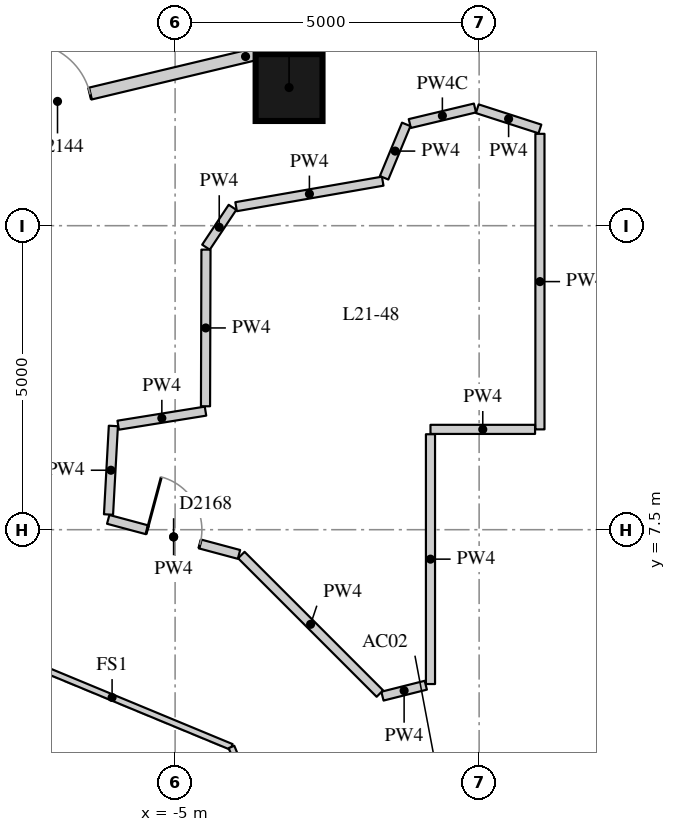
"""IFC4 building model, lengths in metres.
Left out: names, types, materials, properties, quantities, classifications, styles, units other than length and angle.
Written with IfcOpenShell. Run it as: python <this file> out.ifc"""

import sys

from ifc_helpers import new_model, si_unit, direction, frame, frame_2d, origin, origin_2d, place, context, subcontext, project, spatial, rectangle, extrude, element, fill, save


model = new_model("IFC4")
c1 = context("Model", 3, precision=1e-05, world=origin(), true_north=direction((0.0, 1.0)))
c2 = subcontext(c1, "Body", "Model", "MODEL_VIEW")
j1 = project(units=[si_unit("LENGTHUNIT", "METRE"), si_unit("PLANEANGLEUNIT", "RADIAN")], contexts=[c1])
p1 = place(None, origin())
s1 = spatial("IfcSite", under=j1, at=p1, CompositionType="ELEMENT")
p2 = place(p1, origin())
s2 = spatial("IfcBuilding", under=s1, at=p2, CompositionType="ELEMENT")
p3 = place(p2, frame((0.0, 0.0, 77.8)))
s3 = spatial("IfcBuildingStorey", under=s2, at=p3, CompositionType="ELEMENT", Elevation=77.8)
p4 = place(p3, frame((-3.126, 14.772, 0.0), z_axis=(0.0, 0.0, 1.0), x_axis=(1.0, 0.0, 0.0)))
e1 = element("IfcColumn", 1, at=p4, inside=s3, PredefinedType="COLUMN", context=c2, shape_type="SweptSolid", body=[
    extrude(rectangle(XDim=1.1, YDim=1.1, at=origin_2d()), origin(), (0.0, 0.0, 1.0), 3.3),
])
p5 = place(p3, frame((-7.683, 14.365, 0.0), z_axis=(0.0, 0.0, 1.0), x_axis=(0.972657109353, 0.23224587752, 0.0)))
e2 = element("IfcWall", 2, at=p5, inside=s3, PredefinedType="PARTITIONING", context=c2, shape_type="SweptSolid", body=[
    extrude(rectangle(XDim=7.899, YDim=0.2, at=frame_2d((3.949, 0.0))), origin(), (0.0, 0.0, 1.0), 2.57),
])
p6 = place(p5, frame((0.22, 0.0, 0.0)))
e3 = element("IfcOpeningElement", 3, at=p6, cuts=e2, PredefinedType="OPENING", context=c2, shape_type="SweptSolid", body=[
    extrude(rectangle(XDim=1.1, YDim=2.1, at=frame_2d((0.55, 1.05))), frame((0.0, 0.11, 0.0), z_axis=(0.0, -1.0, 0.0), x_axis=(1.0, 0.0, 0.0)), (0.0, 0.0, 1.0), 0.22),
])
p7 = place(p3, frame((0.095, 16.169, 0.0), z_axis=(0.0, 0.0, 1.0), x_axis=(0.951667112614, -0.307131416122, 0.0)))
e4 = element("IfcWall", 4, at=p7, inside=s3, PredefinedType="PARTITIONING", context=c2, shape_type="SweptSolid", body=[
    extrude(rectangle(XDim=8.041, YDim=0.2, at=frame_2d((4.02, 0.0))), origin(), (0.0, 0.0, 1.0), 3.02),
])
p8 = place(p7, frame((4.309, 0.0, 0.0)))
e5 = element("IfcOpeningElement", 5, at=p8, cuts=e4, PredefinedType="OPENING", context=c2, shape_type="SweptSolid", body=[
    extrude(rectangle(XDim=1.1, YDim=2.1, at=frame_2d((0.55, 1.05))), frame((0.0, 0.11, 0.0), z_axis=(0.0, -1.0, 0.0), x_axis=(1.0, 0.0, 0.0)), (0.0, 0.0, 1.0), 0.22),
])
p9 = place(p3, frame((-4.492, 12.146, 0.0), z_axis=(0.0, 0.0, 1.0), x_axis=(0.553770185429, 0.832669551341, 0.0)))
e6 = element("IfcWall", 6, at=p9, inside=s3, PredefinedType="PARTITIONING", context=c2, shape_type="SweptSolid", body=[
    extrude(rectangle(XDim=0.788, YDim=0.15, at=frame_2d((0.394, 0.0))), origin(), (0.0, 0.0, 1.0), 3.02),
])
p10 = place(p3, frame((-3.997, 12.812, 0.0), z_axis=(0.0, 0.0, 1.0), x_axis=(0.985187584004, 0.171480098917, 0.0)))
e7 = element("IfcWall", 7, at=p10, inside=s3, PredefinedType="PARTITIONING", context=c2, shape_type="SweptSolid", body=[
    extrude(rectangle(XDim=2.447, YDim=0.15, at=frame_2d((1.224, 0.0))), origin(), (0.0, 0.0, 1.0), 3.02),
])
p11 = place(p3, frame((-1.563, 13.288, 0.0), z_axis=(0.0, 0.0, 1.0), x_axis=(0.382918810849, 0.923782000419, 0.0)))
e8 = element("IfcWall", 8, at=p11, inside=s3, PredefinedType="PARTITIONING", context=c2, shape_type="SweptSolid", body=[
    extrude(rectangle(XDim=0.951, YDim=0.15, at=frame_2d((0.475, 0.0))), origin(), (0.0, 0.0, 1.0), 3.02),
])
p12 = place(p3, frame((-1.14, 14.18, 0.0), z_axis=(0.0, 0.0, 1.0), x_axis=(0.972668158826, 0.232199596913, 0.0)))
e9 = element("IfcWall", 9, at=p12, inside=s3, PredefinedType="PARTITIONING", context=c2, shape_type="SweptSolid", body=[
    extrude(rectangle(XDim=1.102, YDim=0.15, at=frame_2d((0.551, 0.0))), origin(), (0.0, 0.0, 1.0), 2.42),
])
p13 = place(p3, frame((-0.031, 14.424, 0.0), z_axis=(0.0, 0.0, 1.0), x_axis=(0.951683114319, -0.307081829354, 0.0)))
e10 = element("IfcWall", 10, at=p13, inside=s3, PredefinedType="PARTITIONING", context=c2, shape_type="SweptSolid", body=[
    extrude(rectangle(XDim=1.083, YDim=0.15, at=frame_2d((0.542, 0.0))), origin(), (0.0, 0.0, 1.0), 3.02),
])
p14 = place(p3, frame((1.0, 14.011, 0.0), z_axis=(0.0, 0.0, 1.0), x_axis=(0.0, -1.0, 0.0)))
e11 = element("IfcWall", 11, at=p14, inside=s3, PredefinedType="PARTITIONING", context=c2, shape_type="SweptSolid", body=[
    extrude(rectangle(XDim=4.861, YDim=0.15, at=frame_2d((2.431, 0.0))), origin(), (0.0, 0.0, 1.0), 3.02),
])
p15 = place(p3, frame((0.92, 9.15, 0.0), z_axis=(0.0, 0.0, 1.0), x_axis=(-1.0, 0.0, 0.0)))
e12 = element("IfcWall", 12, at=p15, inside=s3, PredefinedType="PARTITIONING", context=c2, shape_type="SweptSolid", body=[
    extrude(rectangle(XDim=1.72, YDim=0.15, at=frame_2d((0.86, 0.0))), origin(), (0.0, 0.0, 1.0), 3.02),
])
p16 = place(p3, frame((-0.8, 9.07, 0.0), z_axis=(0.0, 0.0, 1.0), x_axis=(0.0, -1.0, 0.0)))
e13 = element("IfcWall", 13, at=p16, inside=s3, PredefinedType="PARTITIONING", context=c2, shape_type="SweptSolid", body=[
    extrude(rectangle(XDim=4.108, YDim=0.15, at=frame_2d((2.054, 0.0))), origin(), (0.0, 0.0, 1.0), 3.02),
])
p17 = place(p3, frame((-0.877, 4.942, 0.0), z_axis=(0.0, 0.0, 1.0), x_axis=(-0.969671869719, -0.244410443874, 0.0)))
e14 = element("IfcWall", 14, at=p17, inside=s3, PredefinedType="PARTITIONING", context=c2, shape_type="SweptSolid", body=[
    extrude(rectangle(XDim=0.735, YDim=0.15, at=frame_2d((0.368, 0.0))), origin(), (0.0, 0.0, 1.0), 3.02),
])
p18 = place(p3, frame((-1.633, 4.805, 0.0), z_axis=(0.0, 0.0, 1.0), x_axis=(-0.707068892009, 0.707144668334, 0.0)))
e15 = element("IfcWall", 15, at=p18, inside=s3, PredefinedType="PARTITIONING", context=c2, shape_type="SweptSolid", body=[
    extrude(rectangle(XDim=3.222, YDim=0.15, at=frame_2d((1.611, 0.0))), origin(), (0.0, 0.0, 1.0), 3.02),
])
p19 = place(p3, frame((-3.949, 7.093, 0.0), z_axis=(0.0, 0.0, 1.0), x_axis=(-0.965915749371, 0.258856649746, 0.0)))
e16 = element("IfcWall", 16, at=p19, inside=s3, PredefinedType="PARTITIONING", context=c2, shape_type="SweptSolid", body=[
    extrude(rectangle(XDim=2.227, YDim=0.15, at=frame_2d((1.113, 0.0))), origin(), (0.0, 0.0, 1.0), 3.02),
])
p20 = place(p19, frame((0.663, 0.0, 0.0)))
e17 = element("IfcOpeningElement", 17, at=p20, cuts=e16, PredefinedType="OPENING", context=c2, shape_type="SweptSolid", body=[
    extrude(rectangle(XDim=0.9, YDim=2.1, at=frame_2d((0.45, 1.05))), frame((0.0, 0.085, 0.0), z_axis=(0.0, -1.0, 0.0), x_axis=(1.0, 0.0, 0.0)), (0.0, 0.0, 1.0), 0.17),
])
p21 = place(p3, frame((-6.095, 7.75, 0.0), z_axis=(0.0, 0.0, 1.0), x_axis=(0.05473759482, 0.998500774017, 0.0)))
e18 = element("IfcWall", 18, at=p21, inside=s3, PredefinedType="PARTITIONING", context=c2, shape_type="SweptSolid", body=[
    extrude(rectangle(XDim=1.458, YDim=0.15, at=frame_2d((0.729, 0.0))), origin(), (0.0, 0.0, 1.0), 3.02),
])
p22 = place(p3, frame((-5.936, 9.219, 0.0), z_axis=(0.0, 0.0, 1.0), x_axis=(0.987290432374, 0.158926404803, 0.0)))
e19 = element("IfcWall", 19, at=p22, inside=s3, PredefinedType="PARTITIONING", context=c2, shape_type="SweptSolid", body=[
    extrude(rectangle(XDim=1.455, YDim=0.15, at=frame_2d((0.728, 0.0))), origin(), (0.0, 0.0, 1.0), 3.02),
])
p23 = place(p3, frame((-4.5, 9.53, 0.0), z_axis=(0.0, 0.0, 1.0), x_axis=(0.002937819013, 0.9999956846, 0.0)))
e20 = element("IfcWall", 20, at=p23, inside=s3, PredefinedType="PARTITIONING", context=c2, shape_type="SweptSolid", body=[
    extrude(rectangle(XDim=2.576, YDim=0.15, at=frame_2d((1.288, 0.0))), origin(), (0.0, 0.0, 1.0), 3.02),
])
for number, where, z_axis, x_axis in (
    (21, (-8.0, 5.554, 0.0), (0.0, 0.0, 1.0), (0.924, -0.383, 0.0)),
    (22, (-4.073, 3.927, 0.0), (0.0, 0.0, 1.0), (0.383, -0.924, 0.0)),
):
    element("IfcWall", number, at=place(p3, frame(where, z_axis=z_axis, x_axis=x_axis)), inside=s3, PredefinedType="PARTITIONING", context=c2, shape_type="SweptSolid", body=[
        extrude(rectangle(XDim=4.251, YDim=0.1, at=frame_2d((2.125, 0.0))), origin(), (0.0, 0.0, 1.0), 3.02),
    ])
p24 = place(p6, origin())
e23 = element("IfcDoor", 23, at=p24, inside=s3, OperationType="SINGLE_SWING_LEFT", PredefinedType="DOOR", context=c2, shape_type="SweptSolid", body=[
    extrude(rectangle(XDim=1.1, YDim=2.1, at=frame_2d((0.55, 1.05))), frame((0.0, 0.025, 0.0), z_axis=(0.0, -1.0, 0.0), x_axis=(1.0, 0.0, 0.0)), (0.0, 0.0, 1.0), 0.05),
])
fill(e3, e23)
p25 = place(p20, origin())
e24 = element("IfcDoor", 24, at=p25, inside=s3, OperationType="SINGLE_SWING_LEFT", PredefinedType="DOOR", context=c2, shape_type="SweptSolid", body=[
    extrude(rectangle(XDim=0.9, YDim=2.1, at=frame_2d((0.45, 1.05))), frame((0.0, 0.025, 0.0), z_axis=(0.0, -1.0, 0.0), x_axis=(1.0, 0.0, 0.0)), (0.0, 0.0, 1.0), 0.05),
])
fill(e17, e24)
save(model, sys.argv[1])
